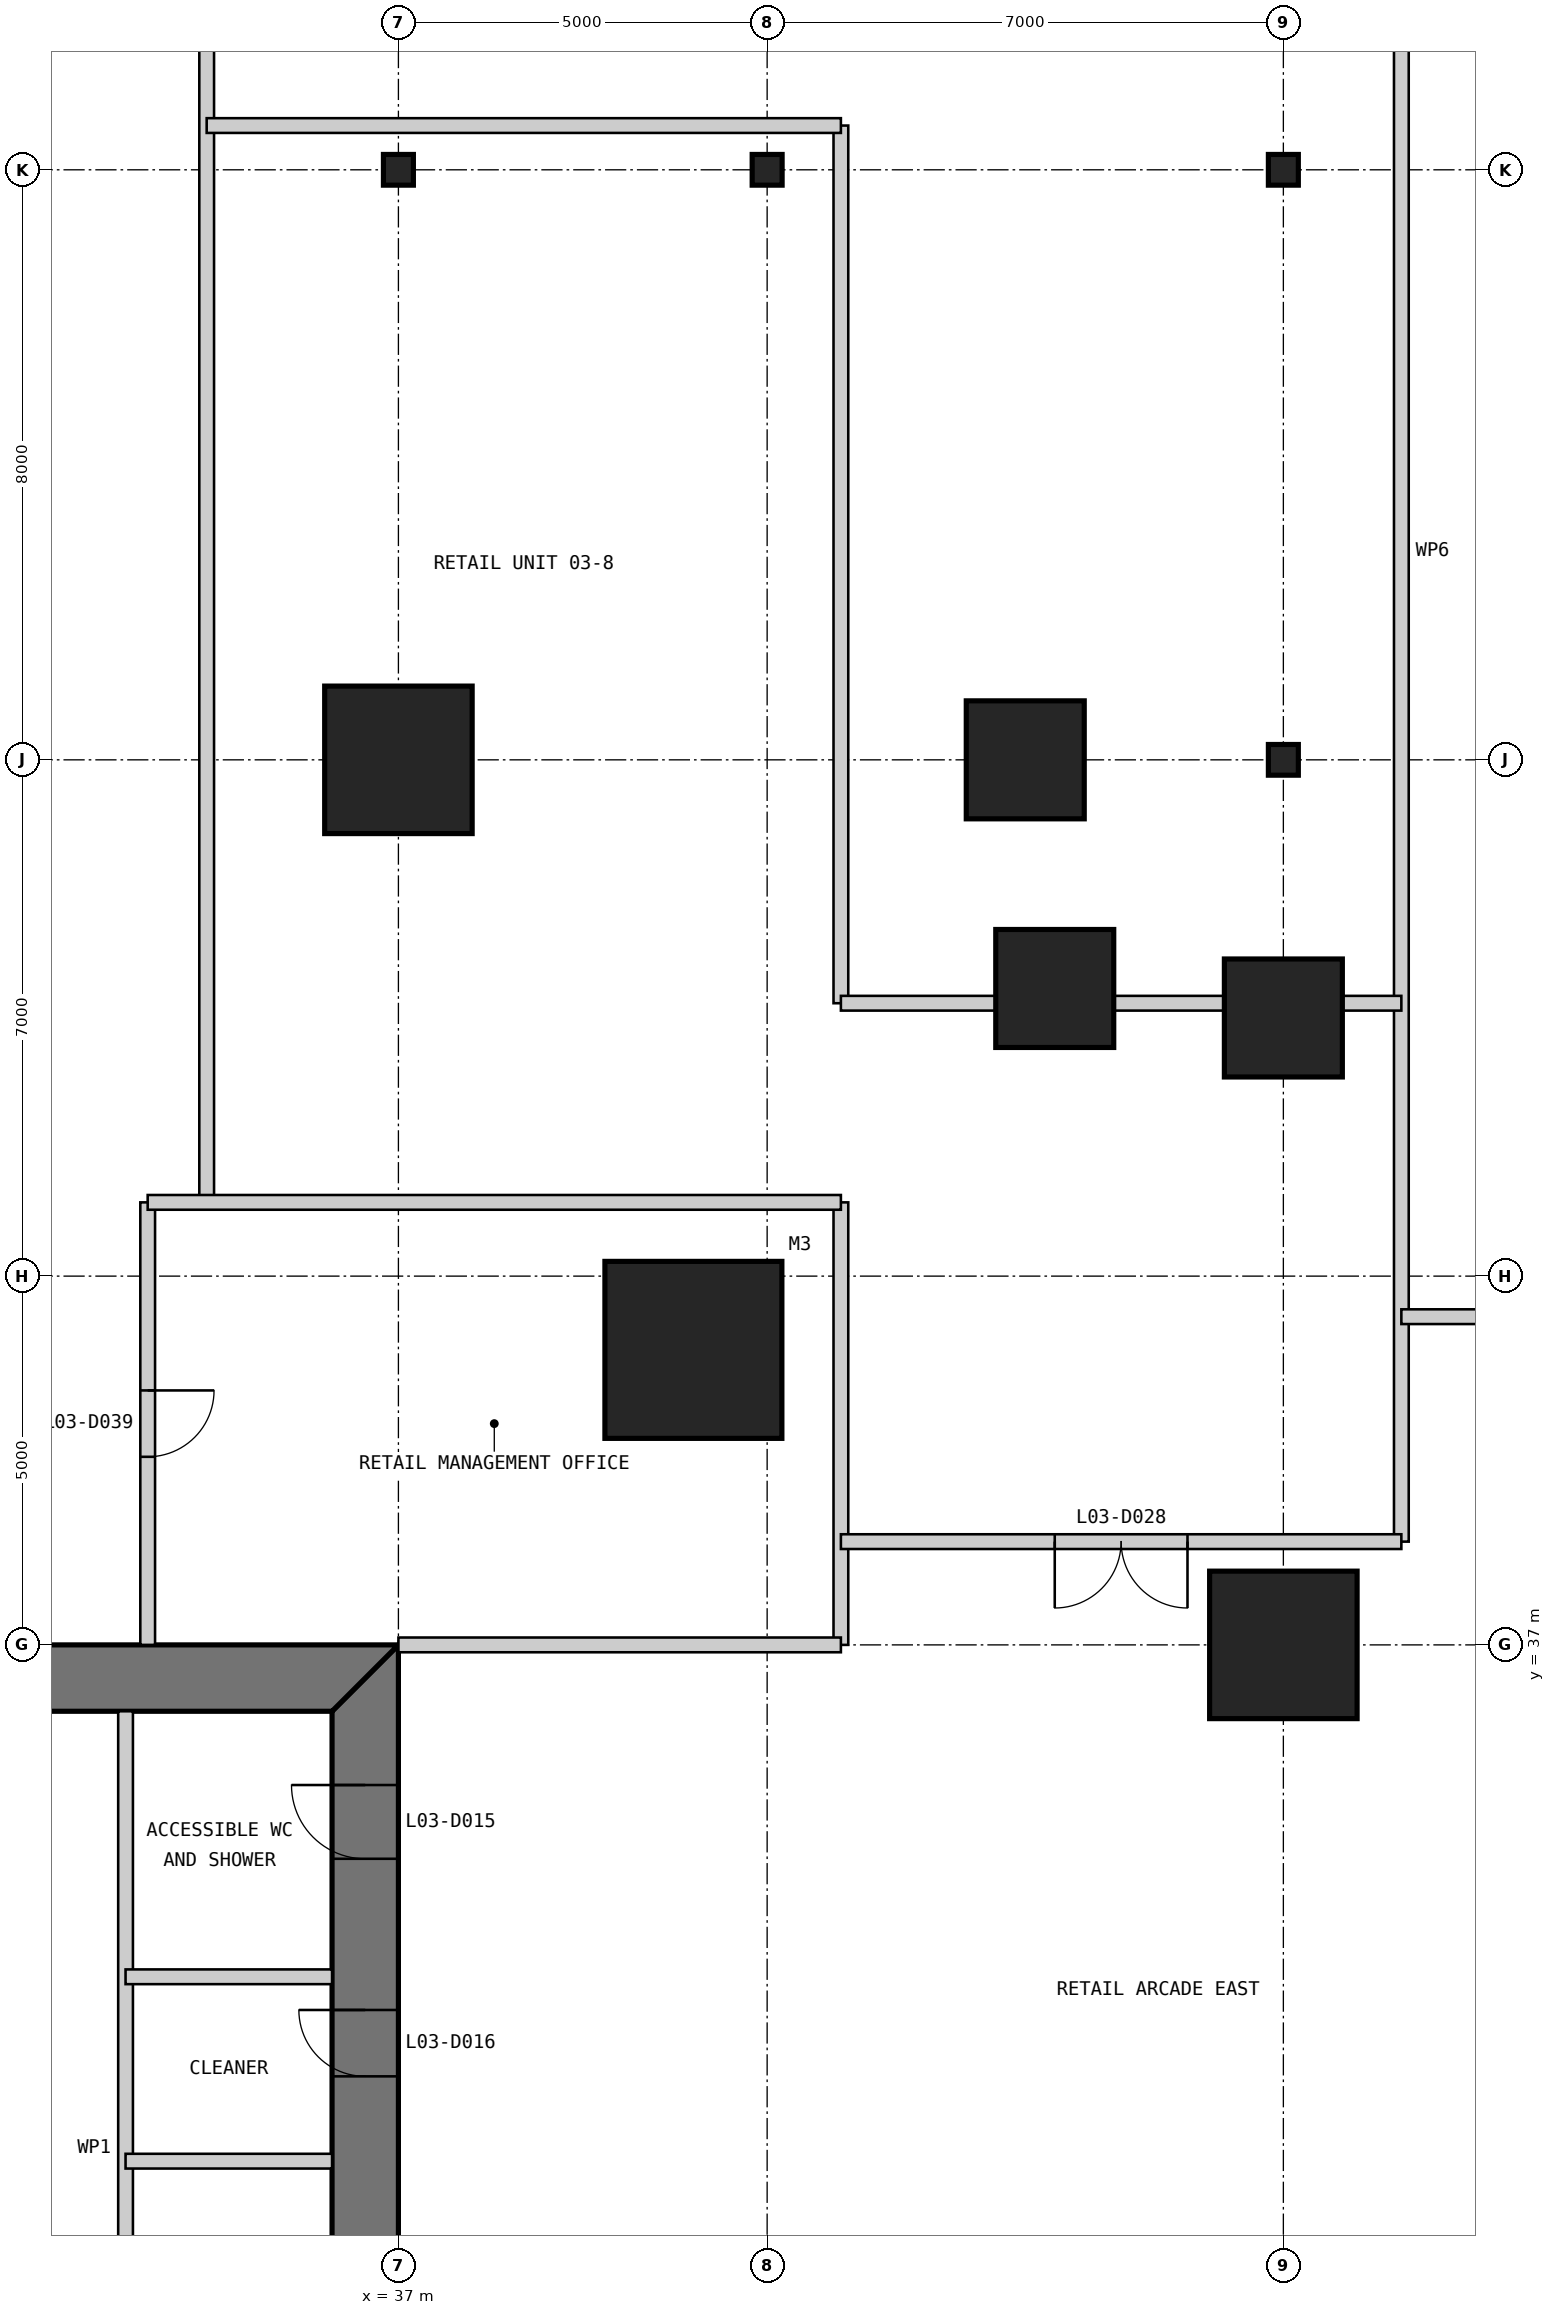
"""IFC4 building model, lengths in metres.
Left out: names, types, materials, properties, quantities, classifications, styles, units other than length and angle.
Written with IfcOpenShell. Run it as: python <this file> out.ifc"""

import sys

from ifc_helpers import new_model, si_unit, direction, frame, frame_2d, origin, origin_2d, place, context, subcontext, project, spatial, polyline, rectangle, i_section, outline, extrude, element, fill, save


model = new_model("IFC4")
c1 = context("Model", 3, precision=1e-05, world=origin(), true_north=direction((0.0, 1.0)))
c2 = subcontext(c1, "Body", "Model", "MODEL_VIEW")
j1 = project(units=[si_unit("LENGTHUNIT", "METRE"), si_unit("PLANEANGLEUNIT", "RADIAN")], contexts=[c1])
p1 = place(None, origin())
s1 = spatial("IfcSite", under=j1, at=p1, CompositionType="ELEMENT")
p2 = place(p1, origin())
s2 = spatial("IfcBuilding", under=s1, at=p2, CompositionType="ELEMENT")
p3 = place(p2, frame((0.0, 0.0, 16.6)))
s3 = spatial("IfcBuildingStorey", under=s2, at=p3, CompositionType="ELEMENT", Elevation=16.6)
p4 = place(p3, frame((41.0, 41.0, 0.0), z_axis=(0.0, 0.0, 1.0), x_axis=(1.0, 0.0, 0.0)))
e1 = element("IfcColumn", 1, at=p4, inside=s3, PredefinedType="COLUMN", context=c2, shape_type="SweptSolid", body=[
    extrude(rectangle(XDim=2.4, YDim=2.4, at=origin_2d()), origin(), (0.0, 0.0, 1.0), 4.8),
])
p5 = place(p3, frame((49.0, 37.0, 0.0), z_axis=(0.0, 0.0, 1.0), x_axis=(1.0, 0.0, 0.0)))
e2 = element("IfcColumn", 2, at=p5, inside=s3, PredefinedType="COLUMN", context=c2, shape_type="SweptSolid", body=[
    extrude(rectangle(XDim=2.0, YDim=2.0, at=origin_2d()), origin(), (0.0, 0.0, 1.0), 4.8),
])
for number, where, z_axis, x_axis in (
    (3, (49.0, 45.5, 0.0), (0.0, 0.0, 1.0), (1.0, 0.0, 0.0)),
    (4, (45.9, 45.9, 0.0), (0.0, 0.0, 1.0), (1.0, 0.0, 0.0)),
    (5, (45.5, 49.0, 0.0), (0.0, 0.0, 1.0), (1.0, 0.0, 0.0)),
):
    element("IfcColumn", number, at=place(p3, frame(where, z_axis=z_axis, x_axis=x_axis)), inside=s3, PredefinedType="COLUMN", context=c2, shape_type="SweptSolid", body=[
        extrude(rectangle(XDim=1.6, YDim=1.6, at=origin_2d()), origin(), (0.0, 0.0, 1.0), 4.8),
    ])
p6 = place(p3, frame((37.0, 49.0, 0.0), z_axis=(0.0, 0.0, 1.0), x_axis=(1.0, 0.0, 0.0)))
e6 = element("IfcColumn", 6, at=p6, inside=s3, PredefinedType="COLUMN", context=c2, shape_type="SweptSolid", body=[
    extrude(rectangle(XDim=2.0, YDim=2.0, at=origin_2d()), origin(), (0.0, 0.0, 1.0), 4.8),
])
for number, where, z_axis, x_axis in (
    (7, (37.0, 57.0, 0.0), (0.0, 0.0, 1.0), (1.0, 0.0, 0.0)),
    (8, (42.0, 57.0, 0.0), (0.0, 0.0, 1.0), (1.0, 0.0, 0.0)),
    (9, (49.0, 49.0, 0.0), (0.0, 0.0, 1.0), (1.0, 0.0, 0.0)),
    (10, (49.0, 57.0, 0.0), (0.0, 0.0, 1.0), (1.0, 0.0, 0.0)),
):
    element("IfcColumn", number, at=place(p3, frame(where, z_axis=z_axis, x_axis=x_axis)), inside=s3, PredefinedType="COLUMN", context=c2, shape_type="SweptSolid", body=[
        extrude(i_section(OverallWidth=0.406, OverallDepth=0.417, WebThickness=0.03, FlangeThickness=0.048, at=origin_2d()), origin(), (0.0, 0.0, 1.0), 4.8),
    ])
p7 = place(p3, frame((36.55, 13.9, 0.0), z_axis=(0.0, 0.0, 1.0), x_axis=(0.0, 1.0, 0.0)))
e11 = element("IfcWall", 11, at=p7, inside=s3, PredefinedType="SHEAR", context=c2, shape_type="SweptSolid", body=[
    extrude(outline(polyline([(-0.9, -0.45), (23.1, -0.45), (22.2, 0.45), (0.0, 0.45), (-0.9, -0.45)])), origin(), (0.0, 0.0, 1.0), 4.8),
])
p8 = place(p7, frame((20.2, 0.0, 0.0)))
e12 = element("IfcOpeningElement", 12, at=p8, cuts=e11, PredefinedType="OPENING", context=c2, shape_type="SweptSolid", body=[
    extrude(rectangle(XDim=1.0, YDim=2.2, at=frame_2d((0.5, 1.1))), frame((0.0, 0.46, 0.0), z_axis=(0.0, -1.0, 0.0), x_axis=(1.0, 0.0, 0.0)), (0.0, 0.0, 1.0), 0.92),
])
p9 = place(p7, frame((17.25, 0.0, 0.0)))
e13 = element("IfcOpeningElement", 13, at=p9, cuts=e11, PredefinedType="OPENING", context=c2, shape_type="SweptSolid", body=[
    extrude(rectangle(XDim=0.9, YDim=2.2, at=frame_2d((0.45, 1.1))), frame((0.0, 0.46, 0.0), z_axis=(0.0, -1.0, 0.0), x_axis=(1.0, 0.0, 0.0)), (0.0, 0.0, 1.0), 0.92),
])
p10 = place(p3, frame((37.0, 36.55, 0.0), z_axis=(0.0, 0.0, 1.0), x_axis=(-1.0, 0.0, 0.0)))
e14 = element("IfcWall", 14, at=p10, inside=s3, PredefinedType="SHEAR", context=c2, shape_type="SweptSolid", body=[
    extrude(outline(polyline([(0.0, -0.45), (24.0, -0.45), (23.1, 0.45), (0.9, 0.45), (0.0, -0.45)])), origin(), (0.0, 0.0, 1.0), 4.8),
])
p11 = place(p10, frame((4.9, 0.0, 0.0)))
e15 = element("IfcOpeningElement", 15, at=p11, cuts=e14, PredefinedType="OPENING", context=c2, shape_type="SweptSolid", body=[
    extrude(rectangle(XDim=1.0, YDim=2.2, at=frame_2d((0.5, 1.1))), frame((0.0, 0.46, 0.0), z_axis=(0.0, -1.0, 0.0), x_axis=(1.0, 0.0, 0.0)), (0.0, 0.0, 1.0), 0.92),
])
p12 = place(p10, frame((8.9, 0.0, 0.0)))
e16 = element("IfcOpeningElement", 16, at=p12, cuts=e14, PredefinedType="OPENING", context=c2, shape_type="SweptSolid", body=[
    extrude(rectangle(XDim=1.1, YDim=2.2, at=frame_2d((0.55, 1.1))), frame((0.0, 0.46, 0.0), z_axis=(0.0, -1.0, 0.0), x_axis=(1.0, 0.0, 0.0)), (0.0, 0.0, 1.0), 0.92),
])
p13 = place(p10, frame((15.05, 0.0, 0.0)))
e17 = element("IfcOpeningElement", 17, at=p13, cuts=e14, PredefinedType="OPENING", context=c2, shape_type="SweptSolid", body=[
    extrude(rectangle(XDim=0.9, YDim=2.2, at=frame_2d((0.45, 1.1))), frame((0.0, 0.46, 0.0), z_axis=(0.0, -1.0, 0.0), x_axis=(1.0, 0.0, 0.0)), (0.0, 0.0, 1.0), 0.92),
])
p14 = place(p10, frame((17.9, 0.0, 0.0)))
e18 = element("IfcOpeningElement", 18, at=p14, cuts=e14, PredefinedType="OPENING", context=c2, shape_type="SweptSolid", body=[
    extrude(rectangle(XDim=1.0, YDim=2.2, at=frame_2d((0.5, 1.1))), frame((0.0, 0.46, 0.0), z_axis=(0.0, -1.0, 0.0), x_axis=(1.0, 0.0, 0.0)), (0.0, 0.0, 1.0), 0.92),
])
p15 = place(p10, frame((21.4, 0.0, 0.0)))
e19 = element("IfcOpeningElement", 19, at=p15, cuts=e14, PredefinedType="OPENING", context=c2, shape_type="SweptSolid", body=[
    extrude(rectangle(XDim=1.0, YDim=2.2, at=frame_2d((0.5, 1.1))), frame((0.0, 0.46, 0.0), z_axis=(0.0, -1.0, 0.0), x_axis=(1.0, 0.0, 0.0)), (0.0, 0.0, 1.0), 0.92),
])
p16 = place(p3, frame((33.3, 36.1, 0.0), z_axis=(0.0, 0.0, 1.0), x_axis=(0.0, -1.0, 0.0)))
e20 = element("IfcWall", 20, at=p16, inside=s3, PredefinedType="PARTITIONING", context=c2, shape_type="SweptSolid", body=[
    extrude(rectangle(XDim=16.1, YDim=0.2, at=frame_2d((8.05, 0.0))), origin(), (0.0, 0.0, 1.0), 4.6),
])
for number, where, z_axis, x_axis in (
    (21, (36.1, 30.0, 0.0), (0.0, 0.0, 1.0), (-1.0, 0.0, 0.0)),
    (22, (36.1, 32.5, 0.0), (0.0, 0.0, 1.0), (-1.0, 0.0, 0.0)),
):
    element("IfcWall", number, at=place(p3, frame(where, z_axis=z_axis, x_axis=x_axis)), inside=s3, PredefinedType="PARTITIONING", context=c2, shape_type="SweptSolid", body=[
        extrude(rectangle(XDim=2.8, YDim=0.2, at=frame_2d((1.4, 0.0))), origin(), (0.0, 0.0, 1.0), 4.6),
    ])
p17 = place(p3, frame((33.6, 37.0, 0.0), z_axis=(0.0, 0.0, 1.0), x_axis=(0.0, 1.0, 0.0)))
e23 = element("IfcWall", 23, at=p17, inside=s3, PredefinedType="PARTITIONING", context=c2, shape_type="SweptSolid", body=[
    extrude(rectangle(XDim=6.0, YDim=0.2, at=frame_2d((3.0, 0.0))), origin(), (0.0, 0.0, 1.0), 4.5),
])
p18 = place(p17, frame((2.55, 0.0, 0.0)))
e24 = element("IfcOpeningElement", 24, at=p18, cuts=e23, PredefinedType="OPENING", context=c2, shape_type="SweptSolid", body=[
    extrude(rectangle(XDim=0.9, YDim=2.2, at=frame_2d((0.45, 1.1))), frame((0.0, 0.11, 0.0), z_axis=(0.0, -1.0, 0.0), x_axis=(1.0, 0.0, 0.0)), (0.0, 0.0, 1.0), 0.22),
])
p19 = place(p3, frame((34.4, 43.0, 0.0), z_axis=(0.0, 0.0, 1.0), x_axis=(0.0, 1.0, 0.0)))
e25 = element("IfcWall", 25, at=p19, inside=s3, PredefinedType="PARTITIONING", context=c2, shape_type="SweptSolid", body=[
    extrude(rectangle(XDim=22.25, YDim=0.2, at=frame_2d((11.125, 0.0))), origin(), (0.0, 0.0, 1.0), 4.5),
])
p20 = place(p19, frame((17.5, 0.0, 0.0)))
e26 = element("IfcOpeningElement", 26, at=p20, cuts=e25, PredefinedType="OPENING", context=c2, shape_type="SweptSolid", body=[
    extrude(rectangle(XDim=1.8, YDim=2.4, at=frame_2d((0.9, 1.2))), frame((0.0, 0.11, 0.0), z_axis=(0.0, -1.0, 0.0), x_axis=(1.0, 0.0, 0.0)), (0.0, 0.0, 1.0), 0.22),
])
p21 = place(p3, frame((43.0, 37.0, 0.0), z_axis=(0.0, 0.0, 1.0), x_axis=(0.0, 1.0, 0.0)))
e27 = element("IfcWall", 27, at=p21, inside=s3, PredefinedType="PARTITIONING", context=c2, shape_type="SweptSolid", body=[
    extrude(rectangle(XDim=6.0, YDim=0.2, at=frame_2d((3.0, 0.0))), origin(), (0.0, 0.0, 1.0), 4.5),
])
p22 = place(p3, frame((43.0, 45.7, 0.0), z_axis=(0.0, 0.0, 1.0), x_axis=(0.0, 1.0, 0.0)))
e28 = element("IfcWall", 28, at=p22, inside=s3, PredefinedType="PARTITIONING", context=c2, shape_type="SweptSolid", body=[
    extrude(rectangle(XDim=11.9, YDim=0.2, at=frame_2d((5.95, 0.0))), origin(), (0.0, 0.0, 1.0), 4.5),
])
p23 = place(p3, frame((50.6, 38.4, 0.0), z_axis=(0.0, 0.0, 1.0), x_axis=(0.0, 1.0, 0.0)))
e29 = element("IfcWall", 29, at=p23, inside=s3, PredefinedType="PARTITIONING", context=c2, shape_type="SweptSolid", body=[
    extrude(rectangle(XDim=26.85, YDim=0.2, at=frame_2d((13.425, 0.0))), origin(), (0.0, 0.0, 1.0), 4.5),
])
p24 = place(p3, frame((37.0, 37.0, 0.0), z_axis=(0.0, 0.0, 1.0), x_axis=(1.0, 0.0, 0.0)))
e30 = element("IfcWall", 30, at=p24, inside=s3, PredefinedType="PARTITIONING", context=c2, shape_type="SweptSolid", body=[
    extrude(rectangle(XDim=6.0, YDim=0.2, at=frame_2d((3.0, 0.0))), origin(), (0.0, 0.0, 1.0), 3.653),
])
p25 = place(p3, frame((43.0, 38.4, 0.0), z_axis=(0.0, 0.0, 1.0), x_axis=(1.0, 0.0, 0.0)))
e31 = element("IfcWall", 31, at=p25, inside=s3, PredefinedType="PARTITIONING", context=c2, shape_type="SweptSolid", body=[
    extrude(rectangle(XDim=7.6, YDim=0.2, at=frame_2d((3.8, 0.0))), origin(), (0.0, 0.0, 1.0), 4.5),
])
p26 = place(p25, frame((2.9, 0.0, 0.0)))
e32 = element("IfcOpeningElement", 32, at=p26, cuts=e31, PredefinedType="OPENING", context=c2, shape_type="SweptSolid", body=[
    extrude(rectangle(XDim=1.8, YDim=2.4, at=frame_2d((0.9, 1.2))), frame((0.0, 0.11, 0.0), z_axis=(0.0, -1.0, 0.0), x_axis=(1.0, 0.0, 0.0)), (0.0, 0.0, 1.0), 0.22),
])
p27 = place(p3, frame((50.6, 41.45, 0.0), z_axis=(0.0, 0.0, 1.0), x_axis=(1.0, 0.0, 0.0)))
e33 = element("IfcWall", 33, at=p27, inside=s3, PredefinedType="PARTITIONING", context=c2, shape_type="SweptSolid", body=[
    extrude(rectangle(XDim=6.65, YDim=0.2, at=frame_2d((3.325, 0.0))), origin(), (0.0, 0.0, 1.0), 4.5),
])
p28 = place(p27, frame((2.425, 0.0, 0.0)))
e34 = element("IfcOpeningElement", 34, at=p28, cuts=e33, PredefinedType="OPENING", context=c2, shape_type="SweptSolid", body=[
    extrude(rectangle(XDim=1.8, YDim=2.4, at=frame_2d((0.9, 1.2))), frame((0.0, 0.11, 0.0), z_axis=(0.0, -1.0, 0.0), x_axis=(1.0, 0.0, 0.0)), (0.0, 0.0, 1.0), 0.22),
])
p29 = place(p3, frame((33.6, 43.0, 0.0), z_axis=(0.0, 0.0, 1.0), x_axis=(1.0, 0.0, 0.0)))
e35 = element("IfcWall", 35, at=p29, inside=s3, PredefinedType="PARTITIONING", context=c2, shape_type="SweptSolid", body=[
    extrude(rectangle(XDim=9.4, YDim=0.2, at=frame_2d((4.7, 0.0))), origin(), (0.0, 0.0, 1.0), 4.5),
])
p30 = place(p3, frame((43.0, 45.7, 0.0), z_axis=(0.0, 0.0, 1.0), x_axis=(1.0, 0.0, 0.0)))
e36 = element("IfcWall", 36, at=p30, inside=s3, PredefinedType="PARTITIONING", context=c2, shape_type="SweptSolid", body=[
    extrude(rectangle(XDim=2.1, YDim=0.2, at=frame_2d((1.05, 0.0))), origin(), (0.0, 0.0, 1.0), 4.5),
])
p31 = place(p3, frame((46.7, 45.7, 0.0), z_axis=(0.0, 0.0, 1.0), x_axis=(1.0, 0.0, 0.0)))
e37 = element("IfcWall", 37, at=p31, inside=s3, PredefinedType="PARTITIONING", context=c2, shape_type="SweptSolid", body=[
    extrude(rectangle(XDim=1.5, YDim=0.2, at=frame_2d((0.75, 0.0))), origin(), (0.0, 0.0, 1.0), 3.65),
])
p32 = place(p3, frame((49.8, 45.7, 0.0), z_axis=(0.0, 0.0, 1.0), x_axis=(1.0, 0.0, 0.0)))
e38 = element("IfcWall", 38, at=p32, inside=s3, PredefinedType="PARTITIONING", context=c2, shape_type="SweptSolid", body=[
    extrude(rectangle(XDim=0.8, YDim=0.2, at=frame_2d((0.4, 0.0))), origin(), (0.0, 0.0, 1.0), 4.5),
])
p33 = place(p3, frame((34.4, 57.6, 0.0), z_axis=(0.0, 0.0, 1.0), x_axis=(1.0, 0.0, 0.0)))
e39 = element("IfcWall", 39, at=p33, inside=s3, PredefinedType="PARTITIONING", context=c2, shape_type="SweptSolid", body=[
    extrude(rectangle(XDim=8.6, YDim=0.2, at=frame_2d((4.3, 0.0))), origin(), (0.0, 0.0, 1.0), 4.5),
])
p34 = place(p8, origin())
e40 = element("IfcDoor", 40, at=p34, inside=s3, OperationType="SINGLE_SWING_RIGHT", PredefinedType="DOOR", context=c2, shape_type="SweptSolid", body=[
    extrude(rectangle(XDim=1.0, YDim=2.2, at=frame_2d((0.5, 1.1))), frame((0.0, 0.025, 0.0), z_axis=(0.0, -1.0, 0.0), x_axis=(1.0, 0.0, 0.0)), (0.0, 0.0, 1.0), 0.05),
    extrude(outline(polyline([(0.0, 0.0), (0.04, 0.0), (0.04, 2.16), (0.96, 2.16), (0.96, 0.0), (1.0, 0.0), (1.0, 2.2), (0.0, 2.2), (0.0, 0.0)])), frame((0.0, 0.3, 0.0), z_axis=(0.0, -1.0, 0.0), x_axis=(1.0, 0.0, 0.0)), (0.0, 0.0, 1.0), 0.6),
])
fill(e12, e40)
p35 = place(p9, origin())
e41 = element("IfcDoor", 41, at=p35, inside=s3, OperationType="SINGLE_SWING_RIGHT", PredefinedType="DOOR", context=c2, shape_type="SweptSolid", body=[
    extrude(rectangle(XDim=0.9, YDim=2.2, at=frame_2d((0.45, 1.1))), frame((0.0, 0.025, 0.0), z_axis=(0.0, -1.0, 0.0), x_axis=(1.0, 0.0, 0.0)), (0.0, 0.0, 1.0), 0.05),
    extrude(outline(polyline([(0.0, 0.0), (0.04, 0.0), (0.04, 2.16), (0.86, 2.16), (0.86, 0.0), (0.9, 0.0), (0.9, 2.2), (0.0, 2.2), (0.0, 0.0)])), frame((0.0, 0.3, 0.0), z_axis=(0.0, -1.0, 0.0), x_axis=(1.0, 0.0, 0.0)), (0.0, 0.0, 1.0), 0.6),
])
fill(e13, e41)
p36 = place(p26, frame((1.8, 0.0, 0.0), z_axis=(0.0, 0.0, 1.0), x_axis=(-1.0, 0.0, 0.0)))
e42 = element("IfcDoor", 42, at=p36, inside=s3, OperationType="DOUBLE_DOOR_SINGLE_SWING", PredefinedType="DOOR", context=c2, shape_type="SweptSolid", body=[
    extrude(rectangle(XDim=1.8, YDim=2.4, at=frame_2d((0.9, 1.2))), frame((0.0, 0.025, 0.0), z_axis=(0.0, -1.0, 0.0), x_axis=(1.0, 0.0, 0.0)), (0.0, 0.0, 1.0), 0.05),
])
fill(e32, e42)
p37 = place(p18, frame((0.9, 0.0, 0.0), z_axis=(0.0, 0.0, 1.0), x_axis=(-1.0, 0.0, 0.0)))
e43 = element("IfcDoor", 43, at=p37, inside=s3, OperationType="SINGLE_SWING_LEFT", PredefinedType="DOOR", context=c2, shape_type="SweptSolid", body=[
    extrude(rectangle(XDim=0.9, YDim=2.2, at=frame_2d((0.45, 1.1))), frame((0.0, 0.025, 0.0), z_axis=(0.0, -1.0, 0.0), x_axis=(1.0, 0.0, 0.0)), (0.0, 0.0, 1.0), 0.05),
])
fill(e24, e43)
save(model, sys.argv[1])
